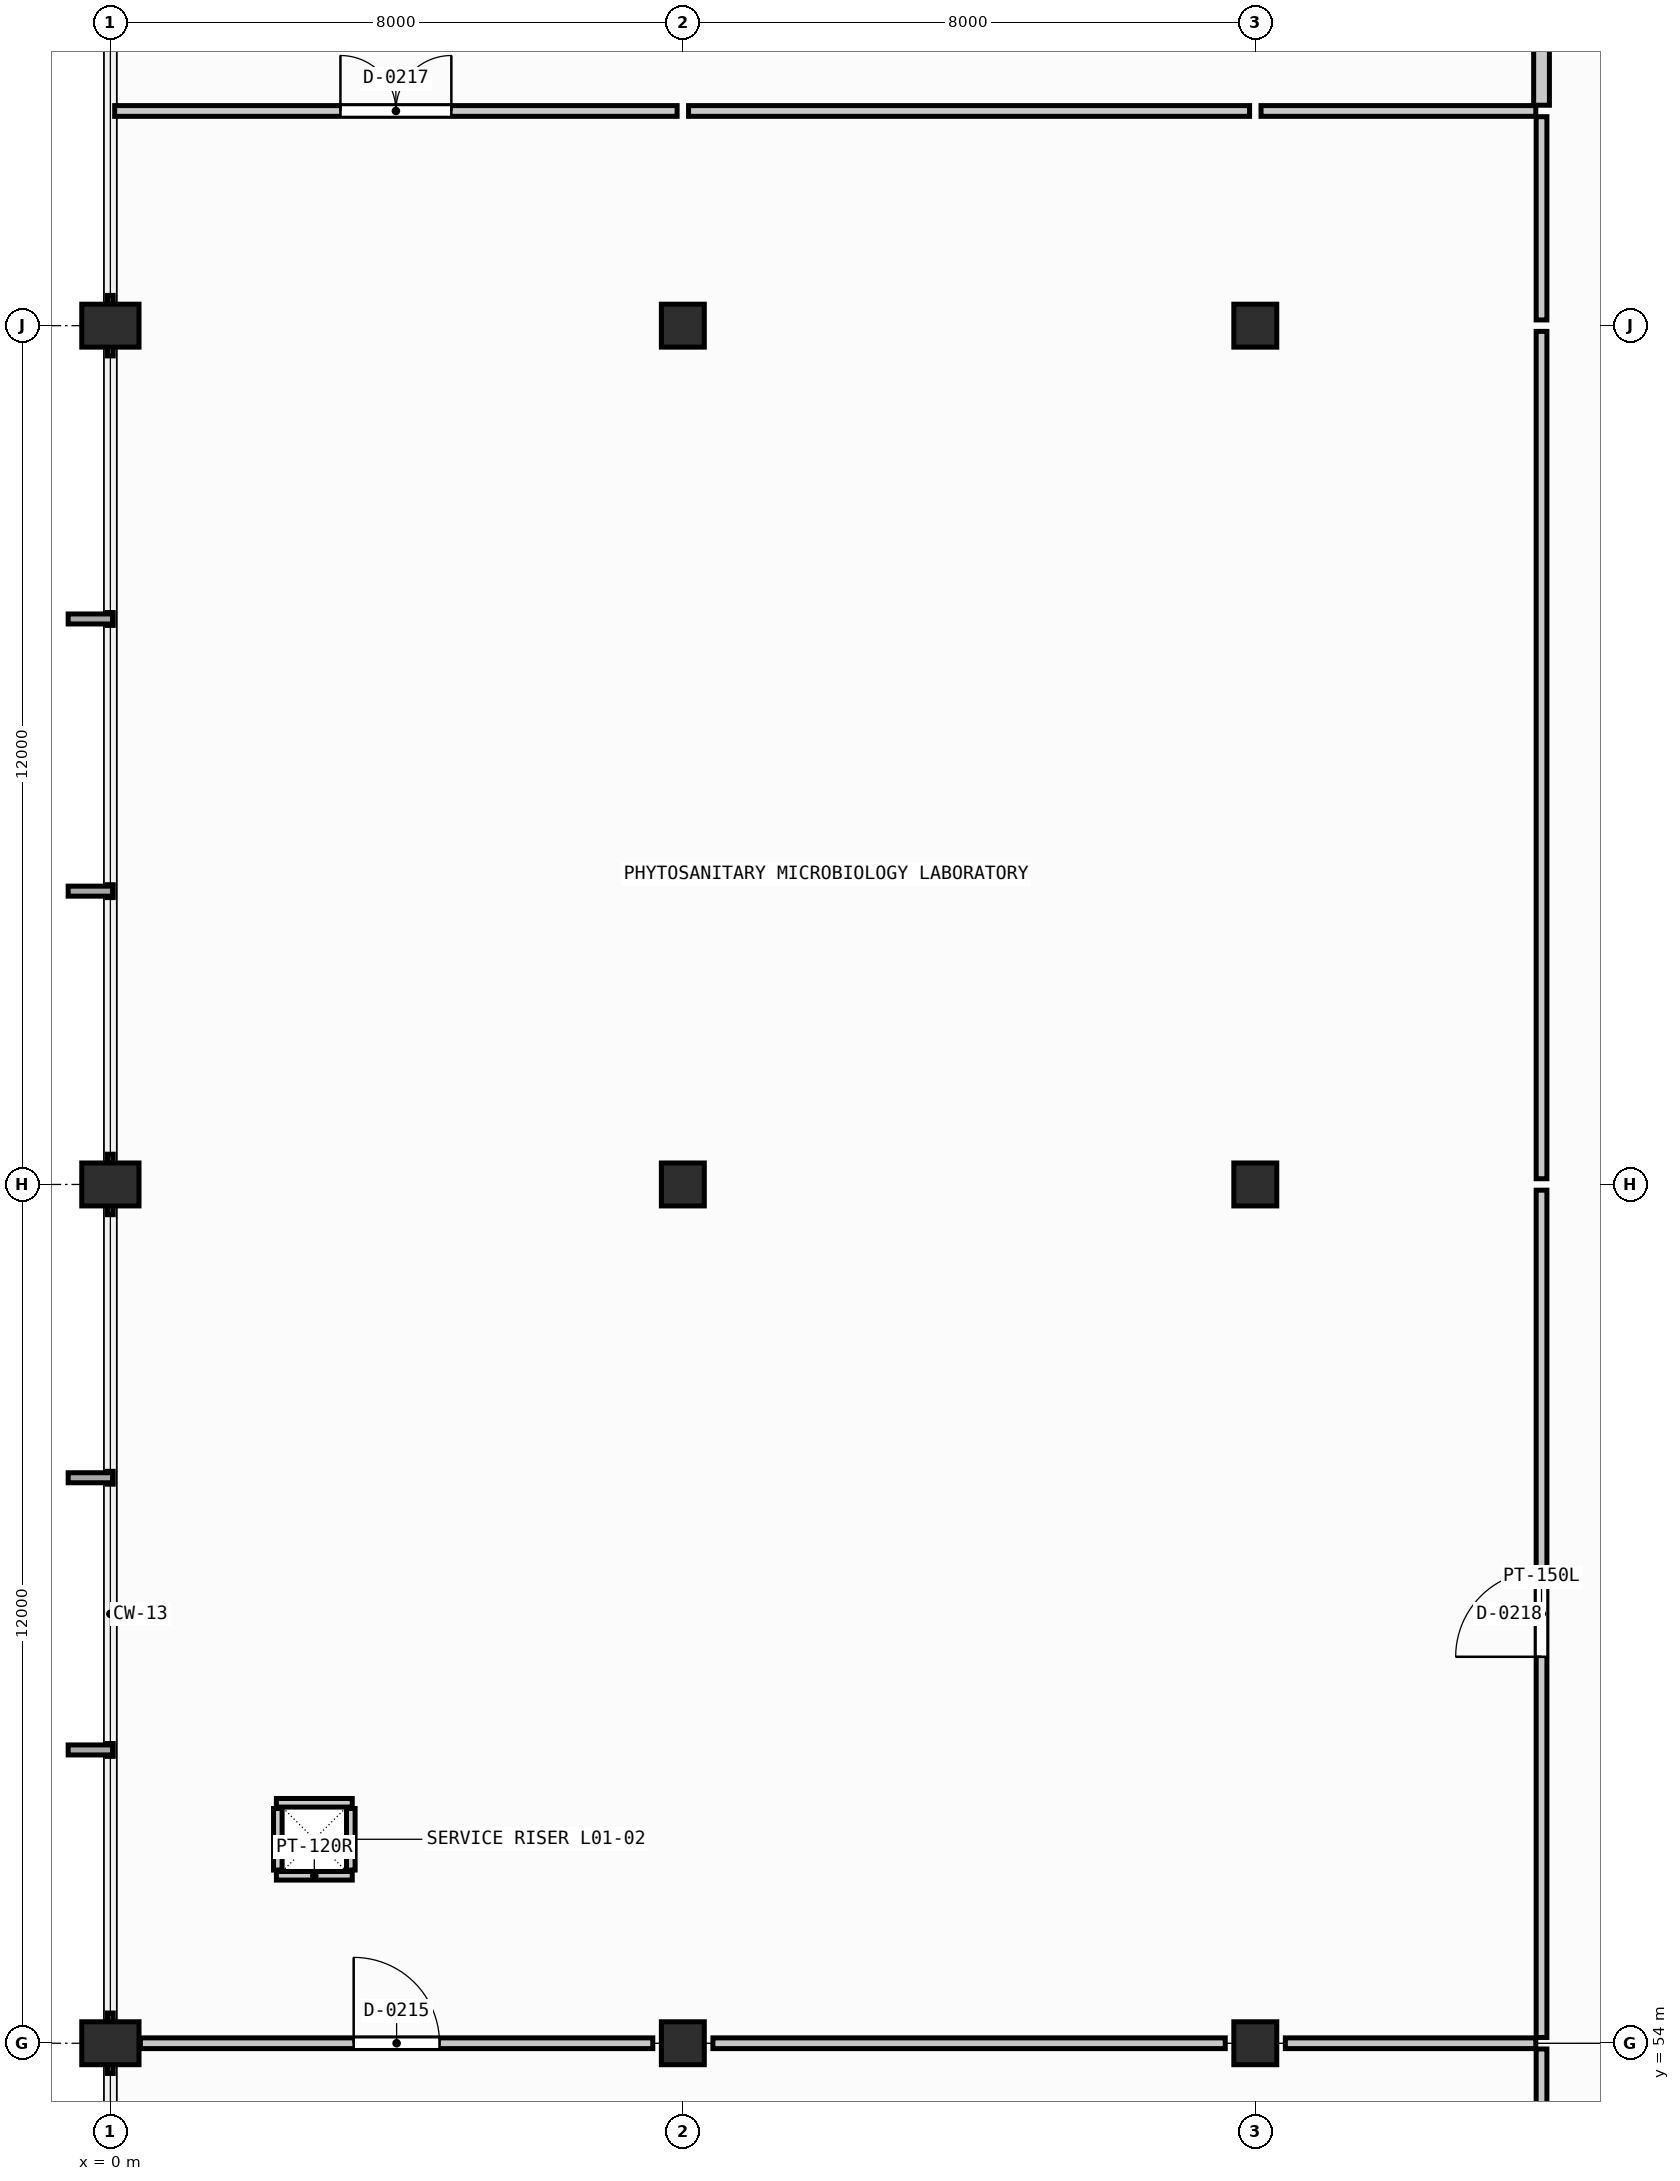
"""IFC4 building model, lengths in metres.
Left out: names, types, materials, properties, quantities, classifications, styles, units other than length and angle.
Written with IfcOpenShell. Run it as: python <this file> out.ifc"""

import sys

from ifc_helpers import new_model, si_unit, direction, frame, frame_2d, origin, origin_2d, place, context, subcontext, project, spatial, rectangle, extrude, element, fill, save


model = new_model("IFC4")
c1 = context("Model", 3, precision=1e-05, world=origin(), true_north=direction((0.0, 1.0)))
c2 = subcontext(c1, "Body", "Model", "MODEL_VIEW")
j1 = project(units=[si_unit("LENGTHUNIT", "METRE"), si_unit("PLANEANGLEUNIT", "RADIAN")], contexts=[c1])
p1 = place(None, origin())
s1 = spatial("IfcSite", under=j1, at=p1, CompositionType="ELEMENT")
p2 = place(p1, origin())
s2 = spatial("IfcBuilding", under=s1, at=p2, CompositionType="ELEMENT")
p3 = place(p2, frame((0.0, 0.0, 4.8)))
s3 = spatial("IfcBuildingStorey", under=s2, at=p3, CompositionType="ELEMENT", Elevation=4.8)
for number, where, z_axis, x_axis in (
    (1, (0.0, 54.0, 0.0), (0.0, 0.0, 1.0), (1.0, 0.0, 0.0)),
    (2, (0.0, 66.0, 0.0), (0.0, 0.0, 1.0), (1.0, 0.0, 0.0)),
    (3, (0.0, 78.0, 0.0), (0.0, 0.0, 1.0), (1.0, 0.0, 0.0)),
):
    element("IfcColumn", number, at=place(p3, frame(where, z_axis=z_axis, x_axis=x_axis)), inside=s3, PredefinedType="COLUMN", context=c2, shape_type="SweptSolid", body=[
        extrude(rectangle(XDim=0.8, YDim=0.6, at=origin_2d()), origin(), (0.0, 0.0, 1.0), 4.2),
    ])
for number, where, z_axis, x_axis in (
    (4, (8.0, 54.0, 0.0), (0.0, 0.0, 1.0), (1.0, 0.0, 0.0)),
    (5, (8.0, 66.0, 0.0), (0.0, 0.0, 1.0), (1.0, 0.0, 0.0)),
    (6, (8.0, 78.0, 0.0), (0.0, 0.0, 1.0), (1.0, 0.0, 0.0)),
    (7, (16.0, 54.0, 0.0), (0.0, 0.0, 1.0), (1.0, 0.0, 0.0)),
    (8, (16.0, 66.0, 0.0), (0.0, 0.0, 1.0), (1.0, 0.0, 0.0)),
    (9, (16.0, 78.0, 0.0), (0.0, 0.0, 1.0), (1.0, 0.0, 0.0)),
):
    element("IfcColumn", number, at=place(p3, frame(where, z_axis=z_axis, x_axis=x_axis)), inside=s3, PredefinedType="COLUMN", context=c2, shape_type="SweptSolid", body=[
        extrude(rectangle(XDim=0.6, YDim=0.6, at=origin_2d()), origin(), (0.0, 0.0, 1.0), 4.2),
    ])
for number, where, z_axis, x_axis in (
    (10, (2.32, 56.34, 0.0), (0.0, 0.0, 1.0), (1.0, 0.0, 0.0)),
    (11, (2.32, 57.36, 0.0), (0.0, 0.0, 1.0), (1.0, 0.0, 0.0)),
):
    element("IfcWall", number, at=place(p3, frame(where, z_axis=z_axis, x_axis=x_axis)), inside=s3, PredefinedType="PARTITIONING", context=c2, shape_type="SweptSolid", body=[
        extrude(rectangle(XDim=1.06, YDim=0.12, at=frame_2d((0.53, 0.0))), origin(), (0.0, 0.0, 1.0), 2.95),
    ])
for number, where, z_axis, x_axis in (
    (12, (2.34, 56.42, 0.0), (0.0, 0.0, 1.0), (0.0, 1.0, 0.0)),
    (13, (3.36, 56.42, 0.0), (0.0, 0.0, 1.0), (0.0, 1.0, 0.0)),
):
    element("IfcWall", number, at=place(p3, frame(where, z_axis=z_axis, x_axis=x_axis)), inside=s3, PredefinedType="PARTITIONING", context=c2, shape_type="SweptSolid", body=[
        extrude(rectangle(XDim=0.86, YDim=0.12, at=frame_2d((0.43, 0.0))), origin(), (0.0, 0.0, 1.0), 2.95),
    ])
p4 = place(p3, frame((0.42, 54.0, 0.0), z_axis=(0.0, 0.0, 1.0), x_axis=(1.0, 0.0, 0.0)))
e14 = element("IfcWall", 14, at=p4, inside=s3, PredefinedType="PARTITIONING", context=c2, shape_type="SweptSolid", body=[
    extrude(rectangle(XDim=7.16, YDim=0.15, at=frame_2d((3.58, 0.0))), origin(), (0.0, 0.0, 1.0), 3.05),
])
p5 = place(p4, frame((2.98, 0.0, 0.0)))
e15 = element("IfcOpeningElement", 15, at=p5, cuts=e14, PredefinedType="OPENING", context=c2, shape_type="SweptSolid", body=[
    extrude(rectangle(XDim=1.2, YDim=2.15, at=frame_2d((0.6, 1.075))), frame((0.0, 0.085, 0.0), z_axis=(0.0, -1.0, 0.0), x_axis=(1.0, 0.0, 0.0)), (0.0, 0.0, 1.0), 0.17),
])
p6 = place(p3, frame((8.42, 54.0, 0.0), z_axis=(0.0, 0.0, 1.0), x_axis=(1.0, 0.0, 0.0)))
e16 = element("IfcWall", 16, at=p6, inside=s3, PredefinedType="PARTITIONING", context=c2, shape_type="SweptSolid", body=[
    extrude(rectangle(XDim=7.16, YDim=0.15, at=frame_2d((3.58, 0.0))), origin(), (0.0, 0.0, 1.0), 3.05),
])
p7 = place(p3, frame((16.42, 54.0, 0.0), z_axis=(0.0, 0.0, 1.0), x_axis=(1.0, 0.0, 0.0)))
e17 = element("IfcWall", 17, at=p7, inside=s3, PredefinedType="PARTITIONING", context=c2, shape_type="SweptSolid", body=[
    extrude(rectangle(XDim=3.5, YDim=0.15, at=frame_2d((1.75, 0.0))), origin(), (0.0, 0.0, 1.0), 3.05),
])
p8 = place(p3, frame((20.0, 45.08, 0.0), z_axis=(0.0, 0.0, 1.0), x_axis=(0.0, 1.0, 0.0)))
e18 = element("IfcWall", 18, at=p8, inside=s3, PredefinedType="PARTITIONING", context=c2, shape_type="SweptSolid", body=[
    extrude(rectangle(XDim=8.84, YDim=0.15, at=frame_2d((4.42, 0.0))), origin(), (0.0, 0.0, 1.0), 3.05),
])
p9 = place(p3, frame((0.06, 81.0, 0.0), z_axis=(0.0, 0.0, 1.0), x_axis=(1.0, 0.0, 0.0)))
e19 = element("IfcWall", 19, at=p9, inside=s3, PredefinedType="PARTITIONING", context=c2, shape_type="SweptSolid", body=[
    extrude(rectangle(XDim=7.86, YDim=0.15, at=frame_2d((3.93, 0.0))), origin(), (0.0, 0.0, 1.0), 3.05),
])
p10 = place(p9, frame((3.155, 0.0, 0.0)))
e20 = element("IfcOpeningElement", 20, at=p10, cuts=e19, PredefinedType="OPENING", context=c2, shape_type="SweptSolid", body=[
    extrude(rectangle(XDim=1.55, YDim=2.2, at=frame_2d((0.775, 1.1))), frame((0.0, 0.085, 0.0), z_axis=(0.0, -1.0, 0.0), x_axis=(1.0, 0.0, 0.0)), (0.0, 0.0, 1.0), 0.17),
])
p11 = place(p3, frame((8.08, 81.0, 0.0), z_axis=(0.0, 0.0, 1.0), x_axis=(1.0, 0.0, 0.0)))
e21 = element("IfcWall", 21, at=p11, inside=s3, PredefinedType="PARTITIONING", context=c2, shape_type="SweptSolid", body=[
    extrude(rectangle(XDim=7.84, YDim=0.15, at=frame_2d((3.92, 0.0))), origin(), (0.0, 0.0, 1.0), 3.05),
])
p12 = place(p3, frame((16.08, 81.0, 0.0), z_axis=(0.0, 0.0, 1.0), x_axis=(1.0, 0.0, 0.0)))
e22 = element("IfcWall", 22, at=p12, inside=s3, PredefinedType="PARTITIONING", context=c2, shape_type="SweptSolid", body=[
    extrude(rectangle(XDim=3.84, YDim=0.15, at=frame_2d((1.92, 0.0))), origin(), (0.0, 0.0, 1.0), 3.05),
])
p13 = place(p3, frame((20.0, 54.08, 0.0), z_axis=(0.0, 0.0, 1.0), x_axis=(0.0, 1.0, 0.0)))
e23 = element("IfcWall", 23, at=p13, inside=s3, PredefinedType="PARTITIONING", context=c2, shape_type="SweptSolid", body=[
    extrude(rectangle(XDim=11.84, YDim=0.15, at=frame_2d((5.92, 0.0))), origin(), (0.0, 0.0, 1.0), 3.05),
])
p14 = place(p13, frame((5.32, 0.0, 0.0)))
e24 = element("IfcOpeningElement", 24, at=p14, cuts=e23, PredefinedType="OPENING", context=c2, shape_type="SweptSolid", body=[
    extrude(rectangle(XDim=1.2, YDim=2.15, at=frame_2d((0.6, 1.075))), frame((0.0, 0.085, 0.0), z_axis=(0.0, -1.0, 0.0), x_axis=(1.0, 0.0, 0.0)), (0.0, 0.0, 1.0), 0.17),
])
p15 = place(p3, frame((20.0, 66.08, 0.0), z_axis=(0.0, 0.0, 1.0), x_axis=(0.0, 1.0, 0.0)))
e25 = element("IfcWall", 25, at=p15, inside=s3, PredefinedType="PARTITIONING", context=c2, shape_type="SweptSolid", body=[
    extrude(rectangle(XDim=11.84, YDim=0.15, at=frame_2d((5.92, 0.0))), origin(), (0.0, 0.0, 1.0), 3.05),
])
p16 = place(p3, frame((20.0, 78.08, 0.0), z_axis=(0.0, 0.0, 1.0), x_axis=(0.0, 1.0, 0.0)))
e26 = element("IfcWall", 26, at=p16, inside=s3, PredefinedType="PARTITIONING", context=c2, shape_type="SweptSolid", body=[
    extrude(rectangle(XDim=2.84, YDim=0.15, at=frame_2d((1.42, 0.0))), origin(), (0.0, 0.0, 1.0), 3.05),
])
p17 = place(p3, frame((20.0, 81.08, 0.0), z_axis=(0.0, 0.0, 1.0), x_axis=(0.0, 1.0, 0.0)))
e27 = element("IfcWall", 27, at=p17, inside=s3, PredefinedType="SOLIDWALL", context=c2, shape_type="SweptSolid", body=[
    extrude(rectangle(XDim=8.86, YDim=0.22, at=frame_2d((4.43, 0.0))), origin(), (0.0, 0.0, 1.0), 3.05),
])
p18 = place(p17, frame((3.405, 0.0, 0.0)))
e28 = element("IfcOpeningElement", 28, at=p18, cuts=e27, PredefinedType="OPENING", context=c2, shape_type="SweptSolid", body=[
    extrude(rectangle(XDim=2.05, YDim=2.4, at=frame_2d((1.025, 1.2))), frame((0.0, 0.12, 0.0), z_axis=(0.0, -1.0, 0.0), x_axis=(1.0, 0.0, 0.0)), (0.0, 0.0, 1.0), 0.24),
])
p19 = place(p5, origin())
e29 = element("IfcDoor", 29, at=p19, inside=s3, OperationType="SINGLE_SWING_LEFT", PredefinedType="DOOR", context=c2, shape_type="SweptSolid", body=[
    extrude(rectangle(XDim=1.2, YDim=2.15, at=frame_2d((0.6, 1.075))), frame((0.0, 0.025, 0.0), z_axis=(0.0, -1.0, 0.0), x_axis=(1.0, 0.0, 0.0)), (0.0, 0.0, 1.0), 0.05),
])
fill(e15, e29)
p20 = place(p10, origin())
e30 = element("IfcDoor", 30, at=p20, inside=s3, OperationType="DOUBLE_DOOR_SINGLE_SWING", PredefinedType="DOOR", context=c2, shape_type="SweptSolid", body=[
    extrude(rectangle(XDim=1.55, YDim=2.2, at=frame_2d((0.775, 1.1))), frame((0.0, 0.025, 0.0), z_axis=(0.0, -1.0, 0.0), x_axis=(1.0, 0.0, 0.0)), (0.0, 0.0, 1.0), 0.05),
])
fill(e20, e30)
p21 = place(p14, origin())
e31 = element("IfcDoor", 31, at=p21, inside=s3, OperationType="SINGLE_SWING_LEFT", PredefinedType="DOOR", context=c2, shape_type="SweptSolid", body=[
    extrude(rectangle(XDim=1.2, YDim=2.15, at=frame_2d((0.6, 1.075))), frame((0.0, 0.025, 0.0), z_axis=(0.0, -1.0, 0.0), x_axis=(1.0, 0.0, 0.0)), (0.0, 0.0, 1.0), 0.05),
])
fill(e24, e31)
save(model, sys.argv[1])
